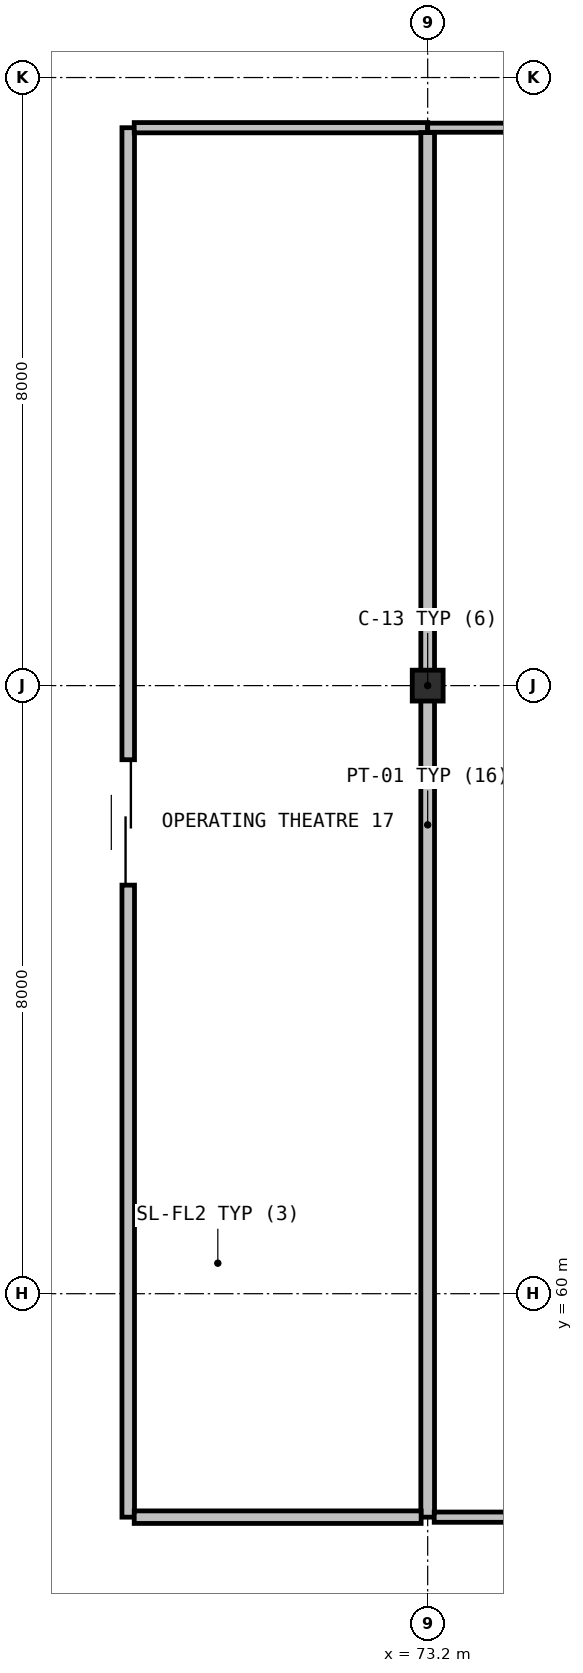
"""IFC4 building model, lengths in metres.
Left out: names, types, materials, properties, quantities, classifications, styles, units other than length and angle.
Written with IfcOpenShell. Run it as: python <this file> out.ifc"""

import sys

from ifc_helpers import new_model, si_unit, direction, frame, frame_2d, origin, origin_2d, place, context, subcontext, project, spatial, rectangle, hollow_circle, extrude, element, fill, save


model = new_model("IFC4")
c1 = context("Model", 3, precision=1e-05, world=origin(), true_north=direction((0.0, 1.0)))
c2 = subcontext(c1, "Body", "Model", "MODEL_VIEW")
j1 = project(units=[si_unit("LENGTHUNIT", "METRE"), si_unit("PLANEANGLEUNIT", "RADIAN")], contexts=[c1])
p1 = place(None, origin())
s1 = spatial("IfcSite", under=j1, at=p1, CompositionType="ELEMENT")
p2 = place(p1, origin())
s2 = spatial("IfcBuilding", under=s1, at=p2, CompositionType="ELEMENT")
p3 = place(p2, frame((0.0, 0.0, 10.2)))
s3 = spatial("IfcBuildingStorey", under=s2, at=p3, CompositionType="ELEMENT", Elevation=10.2)
p4 = place(p3, frame((73.2, 68.0, 0.0), z_axis=(0.0, 0.0, 1.0), x_axis=(1.0, 0.0, 0.0)))
e1 = element("IfcColumn", 1, at=p4, inside=s3, PredefinedType="COLUMN", context=c2, shape_type="SweptSolid", body=[
    extrude(hollow_circle(Radius=0.203, WallThickness=0.016, at=origin_2d()), origin(), (0.0, 0.0, 1.0), 4.8),
])
p5 = place(p3, frame((69.26, 57.06, 0.0), z_axis=(0.0, 0.0, 1.0), x_axis=(0.0, 1.0, 0.0)))
e2 = element("IfcWall", 2, at=p5, inside=s3, PredefinedType="PARTITIONING", context=c2, shape_type="SweptSolid", body=[
    extrude(rectangle(XDim=18.28, YDim=0.165, at=frame_2d((9.14, 0.0))), origin(), (0.0, 0.0, 1.0), 4.46),
])
p6 = place(p5, frame((8.315, 0.0, 0.0)))
e3 = element("IfcOpeningElement", 3, at=p6, cuts=e2, PredefinedType="OPENING", context=c2, shape_type="SweptSolid", body=[
    extrude(rectangle(XDim=1.65, YDim=2.2, at=frame_2d((0.825, 1.1))), frame((0.0, 0.093, 0.0), z_axis=(0.0, -1.0, 0.0), x_axis=(1.0, 0.0, 0.0)), (0.0, 0.0, 1.0), 0.185),
])
p7 = place(p3, frame((69.339, 75.34, 0.0), z_axis=(0.0, 0.0, 1.0), x_axis=(1.0, 0.0, 0.0)))
e4 = element("IfcWall", 4, at=p7, inside=s3, PredefinedType="PARTITIONING", context=c2, shape_type="SweptSolid", body=[
    extrude(rectangle(XDim=3.861, YDim=0.135, at=frame_2d((1.93, 0.0))), origin(), (0.0, 0.0, 1.0), 4.46),
])
p8 = place(p3, frame((73.2, 75.276, 0.0), z_axis=(0.0, 0.0, 1.0), x_axis=(0.0, -1.0, 0.0)))
e5 = element("IfcWall", 5, at=p8, inside=s3, PredefinedType="PARTITIONING", context=c2, shape_type="SweptSolid", body=[
    extrude(rectangle(XDim=18.216, YDim=0.18, at=frame_2d((9.108, 0.0))), origin(), (0.0, 0.0, 1.0), 3.665),
])
p9 = place(p3, frame((73.114, 57.06, 0.0), z_axis=(0.0, 0.0, 1.0), x_axis=(-1.0, 0.0, 0.0)))
e6 = element("IfcWall", 6, at=p9, inside=s3, PredefinedType="PARTITIONING", context=c2, shape_type="SweptSolid", body=[
    extrude(rectangle(XDim=3.775, YDim=0.165, at=frame_2d((1.887, 0.0))), origin(), (0.0, 0.0, 1.0), 4.46),
])
p10 = place(p3, frame((84.869, 57.06, 0.0), z_axis=(0.0, 0.0, 1.0), x_axis=(-1.0, 0.0, 0.0)))
e7 = element("IfcWall", 7, at=p10, inside=s3, PredefinedType="PARTITIONING", context=c2, shape_type="SweptSolid", body=[
    extrude(rectangle(XDim=11.583, YDim=0.135, at=frame_2d((5.792, 0.0))), origin(), (0.0, 0.0, 1.0), 4.46),
])
p11 = place(p10, frame((5.091, 0.0, 0.0)))
e8 = element("IfcOpeningElement", 8, at=p11, cuts=e7, PredefinedType="OPENING", context=c2, shape_type="SweptSolid", body=[
    extrude(rectangle(XDim=1.4, YDim=2.15, at=frame_2d((0.7, 1.075))), frame((0.0, 0.077, 0.0), z_axis=(0.0, -1.0, 0.0), x_axis=(1.0, 0.0, 0.0)), (0.0, 0.0, 1.0), 0.155),
])
p12 = place(p3, frame((73.2, 75.34, 0.0), z_axis=(0.0, 0.0, 1.0), x_axis=(1.0, 0.0, 0.0)))
e9 = element("IfcWall", 9, at=p12, inside=s3, PredefinedType="PARTITIONING", context=c2, shape_type="SweptSolid", body=[
    extrude(rectangle(XDim=8.396, YDim=0.12, at=frame_2d((4.198, 0.0))), origin(), (0.0, 0.0, 1.0), 4.46),
])
p13 = place(p6, origin())
e10 = element("IfcDoor", 10, at=p13, inside=s3, OperationType="DOUBLE_DOOR_SLIDING", PredefinedType="DOOR", context=c2, shape_type="SweptSolid", body=[
    extrude(rectangle(XDim=1.65, YDim=2.2, at=frame_2d((0.825, 1.1))), frame((0.0, 0.025, 0.0), z_axis=(0.0, -1.0, 0.0), x_axis=(1.0, 0.0, 0.0)), (0.0, 0.0, 1.0), 0.05),
])
fill(e3, e10)
save(model, sys.argv[1])
